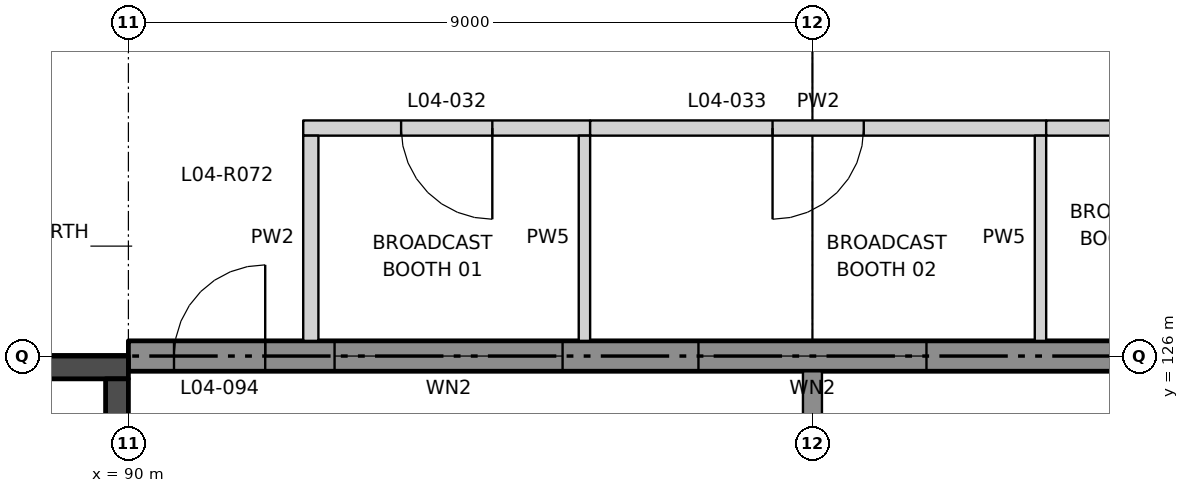
"""IFC4 building model, lengths in metres.
Left out: names, types, materials, properties, quantities, classifications, styles, units other than length and angle.
Written with IfcOpenShell. Run it as: python <this file> out.ifc"""

import sys

from ifc_helpers import new_model, si_unit, direction, frame, frame_2d, origin, place, context, subcontext, project, spatial, rectangle, extrude, element, fill, save


model = new_model("IFC4")
c1 = context("Model", 3, precision=1e-05, world=origin(), true_north=direction((0.0, 1.0)))
c2 = subcontext(c1, "Body", "Model", "MODEL_VIEW")
j1 = project(units=[si_unit("LENGTHUNIT", "METRE"), si_unit("PLANEANGLEUNIT", "RADIAN")], contexts=[c1])
p1 = place(None, origin())
s1 = spatial("IfcSite", under=j1, at=p1, CompositionType="ELEMENT")
p2 = place(p1, origin())
s2 = spatial("IfcBuilding", under=s1, at=p2, CompositionType="ELEMENT")
p3 = place(p2, frame((0.0, 0.0, 28.0)))
s3 = spatial("IfcBuildingStorey", under=s2, at=p3, CompositionType="ELEMENT", Elevation=28.0)
p4 = place(p3, frame((171.0, 126.0, 0.0), z_axis=(0.0, 0.0, 1.0), x_axis=(-1.0, 0.0, 0.0)))
e1 = element("IfcWall", 1, at=p4, inside=s3, PredefinedType="SOLIDWALL", context=c2, shape_type="SweptSolid", body=[
    extrude(rectangle(XDim=81.0, YDim=0.4, at=frame_2d((40.5, 0.0))), origin(), (0.0, 0.0, 1.0), 5.5),
])
p5 = place(p4, frame((75.288, 0.0, 0.9)))
e2 = element("IfcOpeningElement", 2, at=p5, cuts=e1, PredefinedType="OPENING", context=c2, shape_type="SweptSolid", body=[
    extrude(rectangle(XDim=3.0, YDim=1.8, at=frame_2d((1.5, 0.9))), frame((0.0, 0.21, 0.0), z_axis=(0.0, -1.0, 0.0), x_axis=(1.0, 0.0, 0.0)), (0.0, 0.0, 1.0), 0.42),
])
p6 = place(p4, frame((70.5, 0.0, 0.9)))
e3 = element("IfcOpeningElement", 3, at=p6, cuts=e1, PredefinedType="OPENING", context=c2, shape_type="SweptSolid", body=[
    extrude(rectangle(XDim=3.0, YDim=1.8, at=frame_2d((1.5, 0.9))), frame((0.0, 0.21, 0.0), z_axis=(0.0, -1.0, 0.0), x_axis=(1.0, 0.0, 0.0)), (0.0, 0.0, 1.0), 0.42),
])
p7 = place(p4, frame((64.5, 0.0, 0.9)))
e4 = element("IfcOpeningElement", 4, at=p7, cuts=e1, PredefinedType="OPENING", context=c2, shape_type="SweptSolid", body=[
    extrude(rectangle(XDim=3.0, YDim=1.8, at=frame_2d((1.5, 0.9))), frame((0.0, 0.21, 0.0), z_axis=(0.0, -1.0, 0.0), x_axis=(1.0, 0.0, 0.0)), (0.0, 0.0, 1.0), 0.42),
])
p8 = place(p4, frame((58.5, 0.0, 0.9)))
e5 = element("IfcOpeningElement", 5, at=p8, cuts=e1, PredefinedType="OPENING", context=c2, shape_type="SweptSolid", body=[
    extrude(rectangle(XDim=3.0, YDim=1.8, at=frame_2d((1.5, 0.9))), frame((0.0, 0.21, 0.0), z_axis=(0.0, -1.0, 0.0), x_axis=(1.0, 0.0, 0.0)), (0.0, 0.0, 1.0), 0.42),
])
p9 = place(p4, frame((52.5, 0.0, 0.9)))
e6 = element("IfcOpeningElement", 6, at=p9, cuts=e1, PredefinedType="OPENING", context=c2, shape_type="SweptSolid", body=[
    extrude(rectangle(XDim=3.0, YDim=1.8, at=frame_2d((1.5, 0.9))), frame((0.0, 0.21, 0.0), z_axis=(0.0, -1.0, 0.0), x_axis=(1.0, 0.0, 0.0)), (0.0, 0.0, 1.0), 0.42),
])
p10 = place(p4, frame((46.512, 0.0, 0.9)))
e7 = element("IfcOpeningElement", 7, at=p10, cuts=e1, PredefinedType="OPENING", context=c2, shape_type="SweptSolid", body=[
    extrude(rectangle(XDim=3.0, YDim=1.8, at=frame_2d((1.5, 0.9))), frame((0.0, 0.21, 0.0), z_axis=(0.0, -1.0, 0.0), x_axis=(1.0, 0.0, 0.0)), (0.0, 0.0, 1.0), 0.42),
])
p11 = place(p4, frame((3.9, 0.0, 0.0)))
e8 = element("IfcOpeningElement", 8, at=p11, cuts=e1, PredefinedType="OPENING", context=c2, shape_type="SweptSolid", body=[
    extrude(rectangle(XDim=1.2, YDim=2.1, at=frame_2d((0.6, 1.05))), frame((0.0, 0.21, 0.0), z_axis=(0.0, -1.0, 0.0), x_axis=(1.0, 0.0, 0.0)), (0.0, 0.0, 1.0), 0.42),
])
p12 = place(p4, frame((79.2, 0.0, 0.0)))
e9 = element("IfcOpeningElement", 9, at=p12, cuts=e1, PredefinedType="OPENING", context=c2, shape_type="SweptSolid", body=[
    extrude(rectangle(XDim=1.2, YDim=2.1, at=frame_2d((0.6, 1.05))), frame((0.0, 0.21, 0.0), z_axis=(0.0, -1.0, 0.0), x_axis=(1.0, 0.0, 0.0)), (0.0, 0.0, 1.0), 0.42),
])
p13 = place(p3, frame((92.3, 129.0, 0.0), z_axis=(0.0, 0.0, 1.0), x_axis=(1.0, 0.0, 0.0)))
e10 = element("IfcWall", 10, at=p13, inside=s3, PredefinedType="PARTITIONING", context=c2, shape_type="SweptSolid", body=[
    extrude(rectangle(XDim=3.775, YDim=0.2, at=frame_2d((1.887, 0.0))), origin(), (0.0, 0.0, 1.0), 5.5),
])
p14 = place(p13, frame((1.288, 0.0, 0.0)))
e11 = element("IfcOpeningElement", 11, at=p14, cuts=e10, PredefinedType="OPENING", context=c2, shape_type="SweptSolid", body=[
    extrude(rectangle(XDim=1.2, YDim=2.1, at=frame_2d((0.6, 1.05))), frame((0.0, 0.11, 0.0), z_axis=(0.0, -1.0, 0.0), x_axis=(1.0, 0.0, 0.0)), (0.0, 0.0, 1.0), 0.22),
])
p15 = place(p3, frame((96.075, 129.0, 0.0), z_axis=(0.0, 0.0, 1.0), x_axis=(1.0, 0.0, 0.0)))
e12 = element("IfcWall", 12, at=p15, inside=s3, PredefinedType="PARTITIONING", context=c2, shape_type="SweptSolid", body=[
    extrude(rectangle(XDim=6.0, YDim=0.2, at=frame_2d((3.0, 0.0))), origin(), (0.0, 0.0, 1.0), 5.5),
])
p16 = place(p15, frame((2.4, 0.0, 0.0)))
e13 = element("IfcOpeningElement", 13, at=p16, cuts=e12, PredefinedType="OPENING", context=c2, shape_type="SweptSolid", body=[
    extrude(rectangle(XDim=1.2, YDim=2.1, at=frame_2d((0.6, 1.05))), frame((0.0, 0.11, 0.0), z_axis=(0.0, -1.0, 0.0), x_axis=(1.0, 0.0, 0.0)), (0.0, 0.0, 1.0), 0.22),
])
p17 = place(p3, frame((102.075, 129.0, 0.0), z_axis=(0.0, 0.0, 1.0), x_axis=(1.0, 0.0, 0.0)))
e14 = element("IfcWall", 14, at=p17, inside=s3, PredefinedType="PARTITIONING", context=c2, shape_type="SweptSolid", body=[
    extrude(rectangle(XDim=6.0, YDim=0.2, at=frame_2d((3.0, 0.0))), origin(), (0.0, 0.0, 1.0), 5.5),
])
p18 = place(p17, frame((2.4, 0.0, 0.0)))
e15 = element("IfcOpeningElement", 15, at=p18, cuts=e14, PredefinedType="OPENING", context=c2, shape_type="SweptSolid", body=[
    extrude(rectangle(XDim=1.2, YDim=2.1, at=frame_2d((0.6, 1.05))), frame((0.0, 0.11, 0.0), z_axis=(0.0, -1.0, 0.0), x_axis=(1.0, 0.0, 0.0)), (0.0, 0.0, 1.0), 0.22),
])
p19 = place(p3, frame((92.4, 126.2, 0.0), z_axis=(0.0, 0.0, 1.0), x_axis=(0.0, 1.0, 0.0)))
e16 = element("IfcWall", 16, at=p19, inside=s3, PredefinedType="PARTITIONING", context=c2, shape_type="SweptSolid", body=[
    extrude(rectangle(XDim=2.7, YDim=0.2, at=frame_2d((1.35, 0.0))), origin(), (0.0, 0.0, 1.0), 5.5),
])
for number, where, z_axis, x_axis in (
    (17, (96.0, 126.2, 0.0), (0.0, 0.0, 1.0), (0.0, 1.0, 0.0)),
    (18, (102.0, 126.2, 0.0), (0.0, 0.0, 1.0), (0.0, 1.0, 0.0)),
):
    element("IfcWall", number, at=place(p3, frame(where, z_axis=z_axis, x_axis=x_axis)), inside=s3, PredefinedType="PARTITIONING", context=c2, shape_type="SweptSolid", body=[
        extrude(rectangle(XDim=2.7, YDim=0.15, at=frame_2d((1.35, 0.0))), origin(), (0.0, 0.0, 1.0), 5.5),
    ])
p20 = place(p3, frame((90.0, 125.85, 0.0), z_axis=(0.0, 0.0, 1.0), x_axis=(-1.0, 0.0, 0.0)))
e19 = element("IfcWall", 19, at=p20, inside=s3, PredefinedType="SHEAR", context=c2, shape_type="SweptSolid", body=[
    extrude(rectangle(XDim=18.0, YDim=0.3, at=frame_2d((9.0, 0.0))), origin(), (0.0, 0.0, 1.0), 5.5),
])
p21 = place(p3, frame((89.85, 117.3, 0.0), z_axis=(0.0, 0.0, 1.0), x_axis=(0.0, 1.0, 0.0)))
e20 = element("IfcWall", 20, at=p21, inside=s3, PredefinedType="SHEAR", context=c2, shape_type="SweptSolid", body=[
    extrude(rectangle(XDim=8.4, YDim=0.3, at=frame_2d((4.2, 0.0))), origin(), (0.0, 0.0, 1.0), 5.5),
])
p22 = place(p3, frame((99.0, 117.35, 0.0), z_axis=(0.0, 0.0, 1.0), x_axis=(0.0, 1.0, 0.0)))
e21 = element("IfcWall", 21, at=p22, inside=s3, PredefinedType="SOLIDWALL", context=c2, shape_type="SweptSolid", body=[
    extrude(rectangle(XDim=8.45, YDim=0.25, at=frame_2d((4.225, 0.0))), origin(), (0.0, 0.0, 1.0), 4.2),
])
p23 = place(p14, frame((1.2, 0.0, 0.0), z_axis=(0.0, 0.0, 1.0), x_axis=(-1.0, 0.0, 0.0)))
e22 = element("IfcDoor", 22, at=p23, inside=s3, OperationType="SINGLE_SWING_LEFT", PredefinedType="DOOR", context=c2, shape_type="SweptSolid", body=[
    extrude(rectangle(XDim=1.2, YDim=2.1, at=frame_2d((0.6, 1.05))), frame((0.0, 0.025, 0.0), z_axis=(0.0, -1.0, 0.0), x_axis=(1.0, 0.0, 0.0)), (0.0, 0.0, 1.0), 0.05),
])
fill(e11, e22)
p24 = place(p16, frame((1.2, 0.0, 0.0), z_axis=(0.0, 0.0, 1.0), x_axis=(-1.0, 0.0, 0.0)))
e23 = element("IfcDoor", 23, at=p24, inside=s3, OperationType="SINGLE_SWING_RIGHT", PredefinedType="DOOR", context=c2, shape_type="SweptSolid", body=[
    extrude(rectangle(XDim=1.2, YDim=2.1, at=frame_2d((0.6, 1.05))), frame((0.0, 0.025, 0.0), z_axis=(0.0, -1.0, 0.0), x_axis=(1.0, 0.0, 0.0)), (0.0, 0.0, 1.0), 0.05),
])
fill(e13, e23)
p25 = place(p5, origin())
e24 = element("IfcWindow", 24, at=p25, inside=s3, PartitioningType="SINGLE_PANEL", PredefinedType="WINDOW", context=c2, shape_type="SweptSolid", body=[
    extrude(rectangle(XDim=3.0, YDim=1.8, at=frame_2d((1.5, 0.9))), frame((0.0, 0.03, 0.0), z_axis=(0.0, -1.0, 0.0), x_axis=(1.0, 0.0, 0.0)), (0.0, 0.0, 1.0), 0.06),
])
fill(e2, e24)
p26 = place(p6, origin())
e25 = element("IfcWindow", 25, at=p26, inside=s3, PartitioningType="SINGLE_PANEL", PredefinedType="WINDOW", context=c2, shape_type="SweptSolid", body=[
    extrude(rectangle(XDim=3.0, YDim=1.8, at=frame_2d((1.5, 0.9))), frame((0.0, 0.03, 0.0), z_axis=(0.0, -1.0, 0.0), x_axis=(1.0, 0.0, 0.0)), (0.0, 0.0, 1.0), 0.06),
])
fill(e3, e25)
p27 = place(p12, frame((1.2, 0.0, 0.0), z_axis=(0.0, 0.0, 1.0), x_axis=(-1.0, 0.0, 0.0)))
e26 = element("IfcDoor", 26, at=p27, inside=s3, OperationType="SINGLE_SWING_RIGHT", PredefinedType="DOOR", context=c2, shape_type="SweptSolid", body=[
    extrude(rectangle(XDim=1.2, YDim=2.1, at=frame_2d((0.6, 1.05))), frame((0.0, 0.025, 0.0), z_axis=(0.0, -1.0, 0.0), x_axis=(1.0, 0.0, 0.0)), (0.0, 0.0, 1.0), 0.05),
])
fill(e9, e26)
save(model, sys.argv[1])
